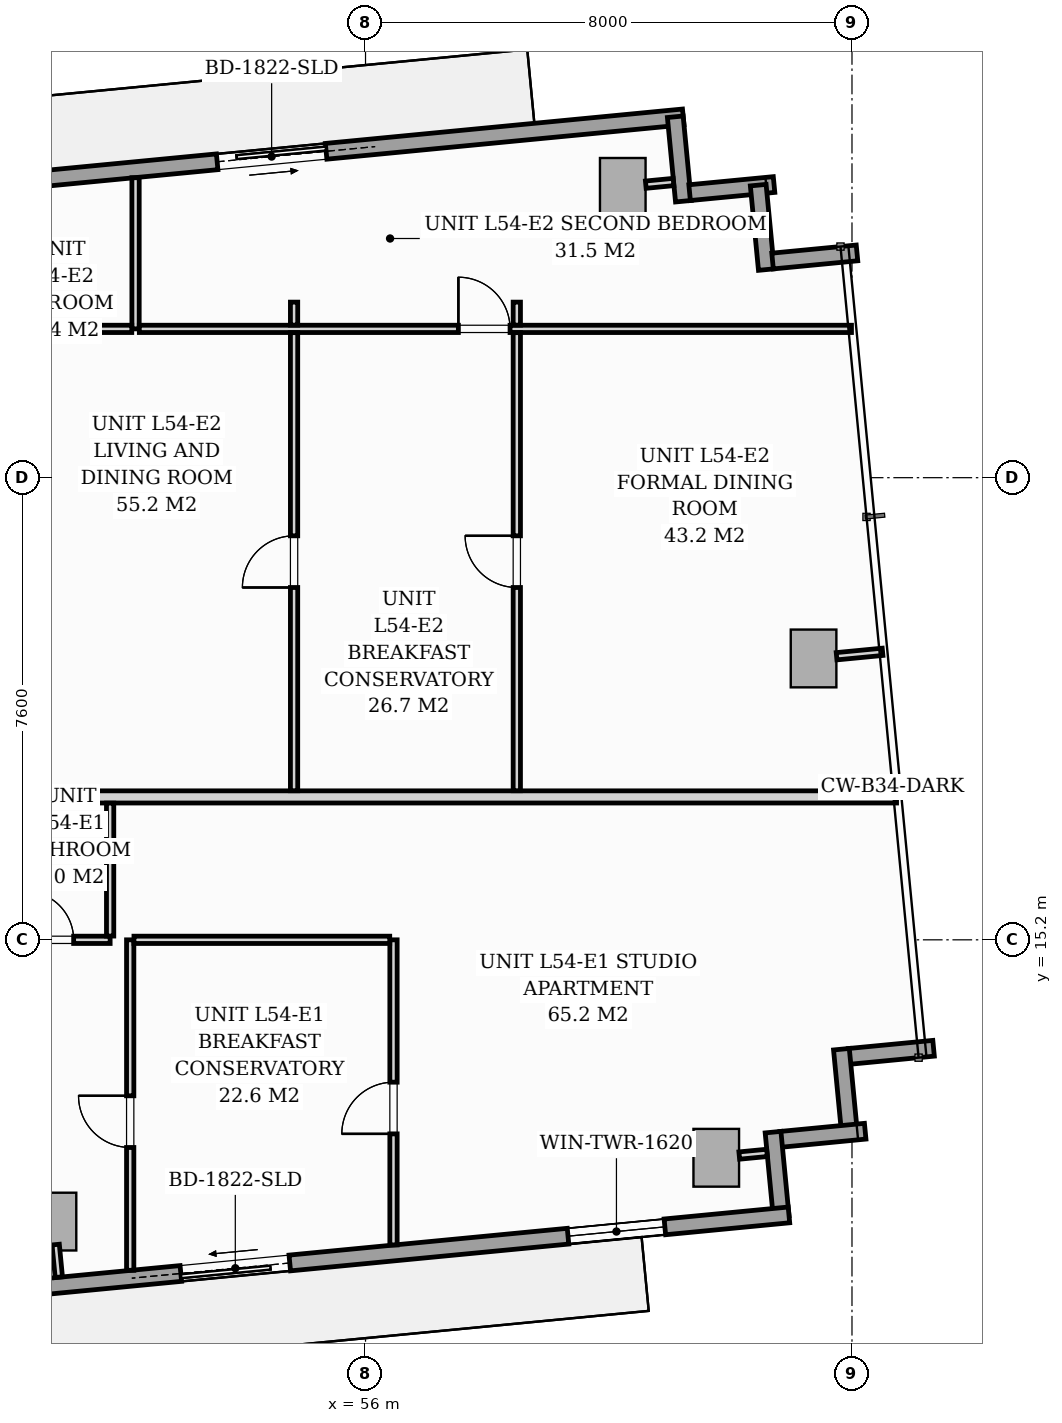
"""IFC4 building model, lengths in metres.
Left out: names, types, materials, properties, quantities, classifications, styles, units other than length and angle.
Written with IfcOpenShell. Run it as: python <this file> out.ifc"""

import sys

from ifc_helpers import new_model, si_unit, direction, frame, frame_2d, origin, origin_2d, place, context, subcontext, project, spatial, rectangle, extrude, source, transform, mapped, element, fill, save


model = new_model("IFC4")
c1 = context("Model", 3, precision=1e-05, world=origin(), true_north=direction((0.0, 1.0)))
c2 = subcontext(c1, "Body", "Model", "MODEL_VIEW")
j1 = project(units=[si_unit("LENGTHUNIT", "METRE"), si_unit("PLANEANGLEUNIT", "RADIAN")], contexts=[c1])
p1 = place(None, origin())
s1 = spatial("IfcSite", under=j1, at=p1, CompositionType="ELEMENT")
p2 = place(p1, origin())
s2 = spatial("IfcBuilding", under=s1, at=p2, CompositionType="ELEMENT")
p3 = place(p2, frame((0.0, 0.0, 189.0)))
s3 = spatial("IfcBuildingStorey", under=s2, at=p3, CompositionType="ELEMENT", Elevation=189.0)
m1 = source(origin(), c2, "Body", "SweptSolid", [
    extrude(rectangle(XDim=0.75, YDim=0.95, at=origin_2d()), origin(), (0.0, 0.0, 1.0), 3.196),
])
for number, where, z_axis, x_axis in (
    (1, (50.868, 10.566, 0.002), (0.0, 0.0, 1.0), (0.995, 0.096, 0.0)),
    (2, (61.768, 11.616, 0.002), (0.0, 0.0, 1.0), (0.995, 0.096, 0.0)),
    (3, (60.23, 27.582, 0.002), (0.0, 0.0, 1.0), (0.995, 0.096, 0.0)),
    (4, (63.368, 19.827, 0.002), (0.0, 0.0, 1.0), (0.995, 0.096, 0.0)),
):
    element("IfcColumn", number, at=place(p3, frame(where, z_axis=z_axis, x_axis=x_axis)), inside=s3, PredefinedType="COLUMN", context=c2, shape_type="MappedRepresentation", body=[
        mapped(m1, transform((0.0, 0.0, 0.0), scale=1.0)),
    ])
p4 = place(p3, frame((45.199, 27.19, 0.0), z_axis=(0.0, 0.0, 1.0), x_axis=(0.995397074604, 0.095836652014, 0.0)))
e5 = element("IfcWall", 5, at=p4, inside=s3, PredefinedType="STANDARD", context=c2, shape_type="SweptSolid", body=[
    extrude(rectangle(XDim=16.1, YDim=0.26, at=frame_2d((8.05, 0.0))), origin(), (0.0, 0.0, 1.0), 2.94),
])
p5 = place(p4, frame((8.4, 0.0, 0.0)))
e6 = element("IfcOpeningElement", 6, at=p5, cuts=e5, PredefinedType="OPENING", context=c2, shape_type="SweptSolid", body=[
    extrude(rectangle(XDim=1.8, YDim=2.06, at=frame_2d((0.9, 1.03))), frame((0.0, 0.14, 0.0), z_axis=(0.0, -1.0, 0.0), x_axis=(1.0, 0.0, 0.0)), (0.0, 0.0, 1.0), 0.28),
])
p6 = place(p4, frame((0.7, 0.0, 0.65)))
e7 = element("IfcOpeningElement", 7, at=p6, cuts=e5, PredefinedType="OPENING", context=c2, shape_type="SweptSolid", body=[
    extrude(rectangle(XDim=1.6, YDim=1.5, at=frame_2d((0.8, 0.75))), frame((0.0, 0.14, 0.0), z_axis=(0.0, -1.0, 0.0), x_axis=(1.0, 0.0, 0.0)), (0.0, 0.0, 1.0), 0.28),
])
p7 = place(p3, frame((61.094, 28.735, 0.0), z_axis=(0.0, 0.0, 1.0), x_axis=(0.095742423056, -0.99540614245, 0.0)))
e8 = element("IfcWall", 8, at=p7, inside=s3, PredefinedType="STANDARD", context=c2, shape_type="SweptSolid", body=[
    extrude(rectangle(XDim=1.395, YDim=0.26, at=frame_2d((0.697, 0.0))), origin(), (0.0, 0.0, 1.0), 2.94),
])
p8 = place(p3, frame((61.33, 27.487, 0.0), z_axis=(0.0, 0.0, 1.0), x_axis=(0.995391056452, 0.09589913835, 0.0)))
e9 = element("IfcWall", 9, at=p8, inside=s3, PredefinedType="STANDARD", context=c2, shape_type="SweptSolid", body=[
    extrude(rectangle(XDim=1.395, YDim=0.26, at=frame_2d((0.698, 0.0))), origin(), (0.0, 0.0, 1.0), 2.94),
])
for number, where, z_axis, x_axis in (
    (10, (62.458, 27.611, 0.0), (0.0, 0.0, 1.0), (0.096, -0.995, 0.0)),
    (11, (62.694, 26.363, 0.0), (0.0, 0.0, 1.0), (0.995, 0.096, 0.0)),
):
    element("IfcWall", number, at=place(p3, frame(where, z_axis=z_axis, x_axis=x_axis)), inside=s3, PredefinedType="STANDARD", context=c2, shape_type="SweptSolid", body=[
        extrude(rectangle(XDim=1.395, YDim=0.26, at=frame_2d((0.697, 0.0))), origin(), (0.0, 0.0, 1.0), 2.94),
    ])
p9 = place(p3, frame((65.342, 13.417, 0.0), z_axis=(0.0, 0.0, 1.0), x_axis=(-0.99540774648, -0.095725744959, 0.0)))
e12 = element("IfcWall", 12, at=p9, inside=s3, PredefinedType="STANDARD", context=c2, shape_type="SweptSolid", body=[
    extrude(rectangle(XDim=1.395, YDim=0.26, at=frame_2d((0.698, 0.0))), origin(), (0.0, 0.0, 1.0), 2.94),
])
p10 = place(p3, frame((63.826, 13.401, 0.0), z_axis=(0.0, 0.0, 1.0), x_axis=(0.095915846097, -0.995389446633, 0.0)))
e13 = element("IfcWall", 13, at=p10, inside=s3, PredefinedType="STANDARD", context=c2, shape_type="SweptSolid", body=[
    extrude(rectangle(XDim=1.395, YDim=0.26, at=frame_2d((0.697, 0.0))), origin(), (0.0, 0.0, 1.0), 2.94),
])
for number, where, z_axis, x_axis in (
    (14, (64.217, 12.053, 0.0), (0.0, 0.0, 1.0), (-0.995, -0.096, 0.0)),
    (15, (62.702, 12.037, 0.0), (0.0, 0.0, 1.0), (0.096, -0.995, 0.0)),
):
    element("IfcWall", number, at=place(p3, frame(where, z_axis=z_axis, x_axis=x_axis)), inside=s3, PredefinedType="STANDARD", context=c2, shape_type="SweptSolid", body=[
        extrude(rectangle(XDim=1.395, YDim=0.26, at=frame_2d((0.698, 0.0))), origin(), (0.0, 0.0, 1.0), 2.94),
    ])
p11 = place(p3, frame((62.963, 10.676, 0.0), z_axis=(0.0, 0.0, 1.0), x_axis=(-0.995395627913, -0.095851676732, 0.0)))
e16 = element("IfcWall", 16, at=p11, inside=s3, PredefinedType="STANDARD", context=c2, shape_type="SweptSolid", body=[
    extrude(rectangle(XDim=16.1, YDim=0.26, at=frame_2d((8.05, 0.0))), origin(), (0.0, 0.0, 1.0), 2.94),
])
p12 = place(p11, frame((8.247, 0.0, 0.0)))
e17 = element("IfcOpeningElement", 17, at=p12, cuts=e16, PredefinedType="OPENING", context=c2, shape_type="SweptSolid", body=[
    extrude(rectangle(XDim=1.8, YDim=2.06, at=frame_2d((0.9, 1.03))), frame((0.0, 0.14, 0.0), z_axis=(0.0, -1.0, 0.0), x_axis=(1.0, 0.0, 0.0)), (0.0, 0.0, 1.0), 0.28),
])
p13 = place(p11, frame((2.05, 0.0, 0.65)))
e18 = element("IfcOpeningElement", 18, at=p13, cuts=e16, PredefinedType="OPENING", context=c2, shape_type="SweptSolid", body=[
    extrude(rectangle(XDim=1.6, YDim=1.5, at=frame_2d((0.8, 0.75))), frame((0.0, 0.14, 0.0), z_axis=(0.0, -1.0, 0.0), x_axis=(1.0, 0.0, 0.0)), (0.0, 0.0, 1.0), 0.28),
])
p14 = place(p3, frame((47.532, 17.55, 0.0), z_axis=(0.0, 0.0, 1.0), x_axis=(1.0, 0.0, 0.0)))
e19 = element("IfcWall", 19, at=p14, inside=s3, PredefinedType="PARTITIONING", context=c2, shape_type="SweptSolid", body=[
    extrude(rectangle(XDim=17.201, YDim=0.2, at=frame_2d((8.601, 0.0))), origin(), (0.0, 0.0, 1.0), 2.281),
])
p15 = place(p3, frame((47.6, 15.2, 0.0), z_axis=(0.0, 0.0, 1.0), x_axis=(1.0, 0.0, 0.0)))
e20 = element("IfcWall", 20, at=p15, inside=s3, PredefinedType="PARTITIONING", context=c2, shape_type="SweptSolid", body=[
    extrude(rectangle(XDim=4.2, YDim=0.12, at=frame_2d((2.1, 0.0))), origin(), (0.0, 0.0, 1.0), 2.94),
])
p16 = place(p15, frame((0.675, 0.0, 0.0)))
e21 = element("IfcOpeningElement", 21, at=p16, cuts=e20, PredefinedType="OPENING", context=c2, shape_type="SweptSolid", body=[
    extrude(rectangle(XDim=0.85, YDim=2.05, at=frame_2d((0.425, 1.025))), frame((0.0, 0.07, 0.0), z_axis=(0.0, -1.0, 0.0), x_axis=(1.0, 0.0, 0.0)), (0.0, 0.0, 1.0), 0.14),
])
p17 = place(p15, frame((2.8, 0.0, 0.0)))
e22 = element("IfcOpeningElement", 22, at=p17, cuts=e20, PredefinedType="OPENING", context=c2, shape_type="SweptSolid", body=[
    extrude(rectangle(XDim=0.8, YDim=2.02, at=frame_2d((0.4, 1.01))), frame((0.0, 0.07, 0.0), z_axis=(0.0, -1.0, 0.0), x_axis=(1.0, 0.0, 0.0)), (0.0, 0.0, 1.0), 0.14),
])
p18 = place(p3, frame((51.8, 15.262, 0.0), z_axis=(0.0, 0.0, 1.0), x_axis=(0.0, 1.0, 0.0)))
e23 = element("IfcWall", 23, at=p18, inside=s3, PredefinedType="PARTITIONING", context=c2, shape_type="SweptSolid", body=[
    extrude(rectangle(XDim=2.186, YDim=0.12, at=frame_2d((1.093, 0.0))), origin(), (0.0, 0.0, 1.0), 2.94),
])
p19 = place(p3, frame((52.13, 9.766, 0.0), z_axis=(0.0, 0.0, 1.0), x_axis=(0.0, 1.0, 0.0)))
e24 = element("IfcWall", 24, at=p19, inside=s3, PredefinedType="PARTITIONING", context=c2, shape_type="SweptSolid", body=[
    extrude(rectangle(XDim=5.434, YDim=0.12, at=frame_2d((2.717, 0.0))), origin(), (0.0, 0.0, 1.0), 2.94),
])
p20 = place(p19, frame((2.019, 0.0, 0.0)))
e25 = element("IfcOpeningElement", 25, at=p20, cuts=e24, PredefinedType="OPENING", context=c2, shape_type="SweptSolid", body=[
    extrude(rectangle(XDim=0.85, YDim=2.05, at=frame_2d((0.425, 1.025))), frame((0.0, 0.07, 0.0), z_axis=(0.0, -1.0, 0.0), x_axis=(1.0, 0.0, 0.0)), (0.0, 0.0, 1.0), 0.14),
])
p21 = place(p3, frame((56.46, 10.183, 0.0), z_axis=(0.0, 0.0, 1.0), x_axis=(0.0, 1.0, 0.0)))
e26 = element("IfcWall", 26, at=p21, inside=s3, PredefinedType="PARTITIONING", context=c2, shape_type="SweptSolid", body=[
    extrude(rectangle(XDim=5.017, YDim=0.12, at=frame_2d((2.509, 0.0))), origin(), (0.0, 0.0, 1.0), 2.94),
])
p22 = place(p21, frame((1.826, 0.0, 0.0)))
e27 = element("IfcOpeningElement", 27, at=p22, cuts=e26, PredefinedType="OPENING", context=c2, shape_type="SweptSolid", body=[
    extrude(rectangle(XDim=0.85, YDim=2.05, at=frame_2d((0.425, 1.025))), frame((0.0, 0.07, 0.0), z_axis=(0.0, -1.0, 0.0), x_axis=(1.0, 0.0, 0.0)), (0.0, 0.0, 1.0), 0.14),
])
p23 = place(p3, frame((52.192, 15.2, 0.0), z_axis=(0.0, 0.0, 1.0), x_axis=(1.0, 0.0, 0.0)))
e28 = element("IfcWall", 28, at=p23, inside=s3, PredefinedType="PARTITIONING", context=c2, shape_type="SweptSolid", body=[
    extrude(rectangle(XDim=4.206, YDim=0.12, at=frame_2d((2.103, 0.0))), origin(), (0.0, 0.0, 1.0), 2.94),
])
p24 = place(p3, frame((52.218, 25.247, 0.0), z_axis=(0.0, 0.0, 1.0), x_axis=(0.0, 1.0, 0.0)))
e29 = element("IfcWall", 29, at=p24, inside=s3, PredefinedType="PARTITIONING", context=c2, shape_type="SweptSolid", body=[
    extrude(rectangle(XDim=2.486, YDim=0.12, at=frame_2d((1.243, 0.0))), origin(), (0.0, 0.0, 1.0), 2.94),
])
p25 = place(p3, frame((40.412, 25.247, 0.0), z_axis=(0.0, 0.0, 1.0), x_axis=(1.0, 0.0, 0.0)))
e30 = element("IfcWall", 30, at=p25, inside=s3, PredefinedType="PARTITIONING", context=c2, shape_type="SweptSolid", body=[
    extrude(rectangle(XDim=11.744, YDim=0.12, at=frame_2d((5.872, 0.0))), origin(), (0.0, 0.0, 1.0), 2.94),
])
p26 = place(p25, frame((6.1, 0.0, 0.0)))
e31 = element("IfcOpeningElement", 31, at=p26, cuts=e30, PredefinedType="OPENING", context=c2, shape_type="SweptSolid", body=[
    extrude(rectangle(XDim=0.85, YDim=2.05, at=frame_2d((0.425, 1.025))), frame((0.0, 0.07, 0.0), z_axis=(0.0, -1.0, 0.0), x_axis=(1.0, 0.0, 0.0)), (0.0, 0.0, 1.0), 0.14),
])
p27 = place(p3, frame((52.28, 25.247, 0.0), z_axis=(0.0, 0.0, 1.0), x_axis=(1.0, 0.0, 0.0)))
e32 = element("IfcWall", 32, at=p27, inside=s3, PredefinedType="PARTITIONING", context=c2, shape_type="SweptSolid", body=[
    extrude(rectangle(XDim=11.712, YDim=0.12, at=frame_2d((5.856, 0.0))), origin(), (0.0, 0.0, 1.0), 2.94),
])
p28 = place(p27, frame((5.247, 0.0, 0.0)))
e33 = element("IfcOpeningElement", 33, at=p28, cuts=e32, PredefinedType="OPENING", context=c2, shape_type="SweptSolid", body=[
    extrude(rectangle(XDim=0.85, YDim=2.05, at=frame_2d((0.425, 1.025))), frame((0.0, 0.07, 0.0), z_axis=(0.0, -1.0, 0.0), x_axis=(1.0, 0.0, 0.0)), (0.0, 0.0, 1.0), 0.14),
])
p29 = place(p3, frame((58.488, 17.652, 0.0), z_axis=(0.0, 0.0, 1.0), x_axis=(0.0, 1.0, 0.0)))
e34 = element("IfcWall", 34, at=p29, inside=s3, PredefinedType="PARTITIONING", context=c2, shape_type="SweptSolid", body=[
    extrude(rectangle(XDim=7.533, YDim=0.12, at=frame_2d((3.767, 0.0))), origin(), (0.0, 0.0, 1.0), 2.94),
])
p30 = place(p29, frame((3.342, 0.0, 0.0)))
e35 = element("IfcOpeningElement", 35, at=p30, cuts=e34, PredefinedType="OPENING", context=c2, shape_type="SweptSolid", body=[
    extrude(rectangle(XDim=0.85, YDim=2.05, at=frame_2d((0.425, 1.025))), frame((0.0, 0.07, 0.0), z_axis=(0.0, -1.0, 0.0), x_axis=(1.0, 0.0, 0.0)), (0.0, 0.0, 1.0), 0.14),
])
p31 = place(p3, frame((58.488, 25.309, 0.0), z_axis=(0.0, 0.0, 1.0), x_axis=(0.0, 1.0, 0.0)))
e36 = element("IfcWall", 36, at=p31, inside=s3, PredefinedType="PARTITIONING", context=c2, shape_type="SweptSolid", body=[
    extrude(rectangle(XDim=0.378, YDim=0.12, at=frame_2d((0.189, 0.0))), origin(), (0.0, 0.0, 1.0), 2.94),
])
p32 = place(p3, frame((54.825, 17.652, 0.0), z_axis=(0.0, 0.0, 1.0), x_axis=(0.0, 1.0, 0.0)))
e37 = element("IfcWall", 37, at=p32, inside=s3, PredefinedType="PARTITIONING", context=c2, shape_type="SweptSolid", body=[
    extrude(rectangle(XDim=7.533, YDim=0.12, at=frame_2d((3.767, 0.0))), origin(), (0.0, 0.0, 1.0), 2.94),
])
p33 = place(p32, frame((3.342, 0.0, 0.0)))
e38 = element("IfcOpeningElement", 38, at=p33, cuts=e37, PredefinedType="OPENING", context=c2, shape_type="SweptSolid", body=[
    extrude(rectangle(XDim=0.85, YDim=2.05, at=frame_2d((0.425, 1.025))), frame((0.0, 0.07, 0.0), z_axis=(0.0, -1.0, 0.0), x_axis=(1.0, 0.0, 0.0)), (0.0, 0.0, 1.0), 0.14),
])
p34 = place(p3, frame((54.825, 25.309, 0.0), z_axis=(0.0, 0.0, 1.0), x_axis=(0.0, 1.0, 0.0)))
e39 = element("IfcWall", 39, at=p34, inside=s3, PredefinedType="PARTITIONING", context=c2, shape_type="SweptSolid", body=[
    extrude(rectangle(XDim=0.378, YDim=0.12, at=frame_2d((0.189, 0.0))), origin(), (0.0, 0.0, 1.0), 2.94),
])
p35 = place(p3, frame((50.905, 10.188, 0.0), z_axis=(0.0, 0.0, 1.0), x_axis=(0.095772948675, -0.995403205893, 0.0)))
e40 = element("IfcWall", 40, at=p35, inside=s3, PredefinedType="PARTITIONING", context=c2, shape_type="SweptSolid", body=[
    extrude(rectangle(XDim=0.538, YDim=0.12, at=frame_2d((0.269, 0.0))), origin(), (0.0, 0.0, 1.0), 2.94),
])
for number, where, z_axis, x_axis in (
    (41, (62.146, 11.652, 0.0), (0.0, 0.0, 1.0), (0.995, 0.096, 0.0)),
    (42, (60.609, 27.618, 0.0), (0.0, 0.0, 1.0), (0.995, 0.096, 0.0)),
):
    element("IfcWall", number, at=place(p3, frame(where, z_axis=z_axis, x_axis=x_axis)), inside=s3, PredefinedType="PARTITIONING", context=c2, shape_type="SweptSolid", body=[
        extrude(rectangle(XDim=0.458, YDim=0.12, at=frame_2d((0.229, 0.0))), origin(), (0.0, 0.0, 1.0), 2.94),
    ])
p36 = place(p3, frame((63.747, 19.864, 0.0), z_axis=(0.0, 0.0, 1.0), x_axis=(0.995405496295, 0.095749140702, 0.0)))
e43 = element("IfcWall", 43, at=p36, inside=s3, PredefinedType="PARTITIONING", context=c2, shape_type="SweptSolid", body=[
    extrude(rectangle(XDim=0.76, YDim=0.12, at=frame_2d((0.38, 0.0))), origin(), (0.0, 0.0, 1.0), 2.94),
])
m2 = source(origin(), c2, "Body", "SweptSolid", [
    extrude(rectangle(XDim=1.8, YDim=2.06, at=frame_2d((0.9, 1.03))), frame((0.0, 0.025, 0.0), z_axis=(0.0, -1.0, 0.0), x_axis=(1.0, 0.0, 0.0)), (0.0, 0.0, 1.0), 0.05),
])
p37 = place(p5, origin())
e44 = element("IfcDoor", 44, at=p37, inside=s3, OperationType="SLIDING_TO_RIGHT", PredefinedType="DOOR", context=c2, shape_type="MappedRepresentation", body=[
    mapped(m2, transform((0.0, 0.0, 0.0), scale=1.0)),
])
fill(e6, e44)
p38 = place(p12, origin())
e45 = element("IfcDoor", 45, at=p38, inside=s3, OperationType="SLIDING_TO_RIGHT", PredefinedType="DOOR", context=c2, shape_type="MappedRepresentation", body=[
    mapped(m2, transform((0.0, 0.0, 0.0), scale=1.0)),
])
fill(e17, e45)
m3 = source(origin(), c2, "Body", "SweptSolid", [
    extrude(rectangle(XDim=1.6, YDim=1.5, at=frame_2d((0.8, 0.75))), frame((0.0, 0.03, 0.0), z_axis=(0.0, -1.0, 0.0), x_axis=(1.0, 0.0, 0.0)), (0.0, 0.0, 1.0), 0.06),
])
p39 = place(p13, origin())
e46 = element("IfcWindow", 46, at=p39, inside=s3, PartitioningType="SINGLE_PANEL", PredefinedType="WINDOW", context=c2, shape_type="MappedRepresentation", body=[
    mapped(m3, transform((0.0, 0.0, 0.0), scale=1.0)),
])
fill(e18, e46)
m4 = source(origin(), c2, "Body", "SweptSolid", [
    extrude(rectangle(XDim=0.85, YDim=2.05, at=frame_2d((0.425, 1.025))), frame((0.0, 0.025, 0.0), z_axis=(0.0, -1.0, 0.0), x_axis=(1.0, 0.0, 0.0)), (0.0, 0.0, 1.0), 0.05),
])
p40 = place(p20, origin())
e47 = element("IfcDoor", 47, at=p40, inside=s3, OperationType="SINGLE_SWING_RIGHT", PredefinedType="DOOR", context=c2, shape_type="MappedRepresentation", body=[
    mapped(m4, transform((0.0, 0.0, 0.0), scale=1.0)),
])
fill(e25, e47)
p41 = place(p22, origin())
e48 = element("IfcDoor", 48, at=p41, inside=s3, OperationType="SINGLE_SWING_LEFT", PredefinedType="DOOR", context=c2, shape_type="MappedRepresentation", body=[
    mapped(m4, transform((0.0, 0.0, 0.0), scale=1.0)),
])
fill(e27, e48)
m5 = source(origin(), c2, "Body", "SweptSolid", [
    extrude(rectangle(XDim=0.8, YDim=2.02, at=frame_2d((0.4, 1.01))), frame((0.0, 0.025, 0.0), z_axis=(0.0, -1.0, 0.0), x_axis=(1.0, 0.0, 0.0)), (0.0, 0.0, 1.0), 0.05),
])
p42 = place(p17, origin())
e49 = element("IfcDoor", 49, at=p42, inside=s3, OperationType="SINGLE_SWING_LEFT", PredefinedType="DOOR", context=c2, shape_type="MappedRepresentation", body=[
    mapped(m5, transform((0.0, 0.0, 0.0), scale=1.0)),
])
fill(e22, e49)
p43 = place(p28, origin())
e50 = element("IfcDoor", 50, at=p43, inside=s3, OperationType="SINGLE_SWING_LEFT", PredefinedType="DOOR", context=c2, shape_type="MappedRepresentation", body=[
    mapped(m4, transform((0.0, 0.0, 0.0), scale=1.0)),
])
fill(e33, e50)
p44 = place(p30, origin())
e51 = element("IfcDoor", 51, at=p44, inside=s3, OperationType="SINGLE_SWING_RIGHT", PredefinedType="DOOR", context=c2, shape_type="MappedRepresentation", body=[
    mapped(m4, transform((0.0, 0.0, 0.0), scale=1.0)),
])
fill(e35, e51)
p45 = place(p33, origin())
e52 = element("IfcDoor", 52, at=p45, inside=s3, OperationType="SINGLE_SWING_LEFT", PredefinedType="DOOR", context=c2, shape_type="MappedRepresentation", body=[
    mapped(m4, transform((0.0, 0.0, 0.0), scale=1.0)),
])
fill(e38, e52)
save(model, sys.argv[1])
